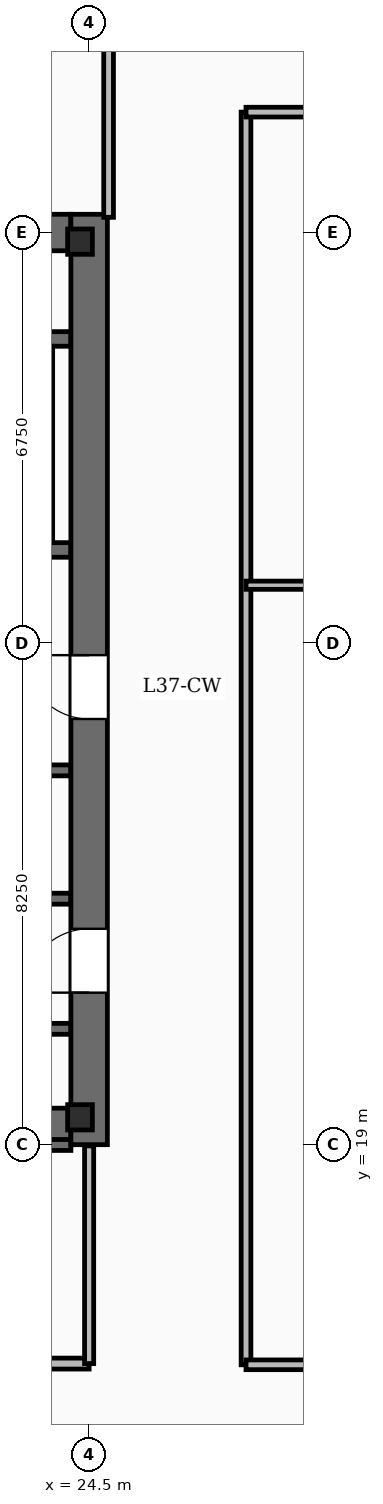
"""IFC4 building model, lengths in metres.
Left out: names, types, materials, properties, quantities, classifications, styles, units other than length and angle.
Written with IfcOpenShell. Run it as: python <this file> out.ifc"""

import sys

from ifc_helpers import new_model, si_unit, direction, frame, frame_2d, origin, origin_2d, place, context, subcontext, project, spatial, rectangle, i_section, extrude, element, fill, save


model = new_model("IFC4")
c1 = context("Model", 3, precision=1e-05, world=origin(), true_north=direction((0.0, 1.0)))
c2 = subcontext(c1, "Body", "Model", "MODEL_VIEW")
j1 = project(units=[si_unit("LENGTHUNIT", "METRE"), si_unit("PLANEANGLEUNIT", "RADIAN")], contexts=[c1])
p1 = place(None, origin())
s1 = spatial("IfcSite", under=j1, at=p1, CompositionType="ELEMENT")
p2 = place(p1, origin())
s2 = spatial("IfcBuilding", under=s1, at=p2, CompositionType="ELEMENT")
p3 = place(p2, frame((0.0, 0.0, 158.45)))
s3 = spatial("IfcBuildingStorey", under=s2, at=p3, CompositionType="ELEMENT", Elevation=158.45)
p4 = place(p3, frame((24.5, 19.0, -0.45), z_axis=(0.0, 0.0, 1.0), x_axis=(0.0, 1.0, 0.0)))
e1 = element("IfcWall", 1, at=p4, inside=s3, PredefinedType="SHEAR", context=c2, shape_type="SweptSolid", body=[
    extrude(rectangle(XDim=15.3, YDim=0.6, at=frame_2d((7.65, 0.0))), origin(), (0.0, 0.0, 1.0), 3.93),
])
p5 = place(p4, frame((2.5, 0.0, 0.45)))
e2 = element("IfcOpeningElement", 2, at=p5, cuts=e1, PredefinedType="OPENING", context=c2, shape_type="SweptSolid", body=[
    extrude(rectangle(XDim=1.05, YDim=2.15, at=frame_2d((0.525, 1.075))), frame((0.0, 0.31, 0.0), z_axis=(0.0, -1.0, 0.0), x_axis=(1.0, 0.0, 0.0)), (0.0, 0.0, 1.0), 0.62),
])
p6 = place(p4, frame((7.0, 0.0, 0.45)))
e3 = element("IfcOpeningElement", 3, at=p6, cuts=e1, PredefinedType="OPENING", context=c2, shape_type="SweptSolid", body=[
    extrude(rectangle(XDim=1.05, YDim=2.15, at=frame_2d((0.525, 1.075))), frame((0.0, 0.31, 0.0), z_axis=(0.0, -1.0, 0.0), x_axis=(1.0, 0.0, 0.0)), (0.0, 0.0, 1.0), 0.62),
])
for number, where, z_axis, x_axis in (
    (4, (14.7, 19.3, -0.45), (0.0, 0.0, 1.0), (1.0, 0.0, 0.0)),
    (5, (14.7, 34.0, -0.45), (0.0, 0.0, 1.0), (1.0, 0.0, 0.0)),
):
    element("IfcWall", number, at=place(p3, frame(where, z_axis=z_axis, x_axis=x_axis)), inside=s3, PredefinedType="SHEAR", context=c2, shape_type="SweptSolid", body=[
        extrude(rectangle(XDim=9.5, YDim=0.6, at=frame_2d((4.75, 0.0))), origin(), (0.0, 0.0, 1.0), 3.93),
    ])
for number, where, z_axis, x_axis in (
    (6, (24.35, 19.45, -0.45), (0.0, 0.0, 1.0), (1.0, 0.0, 0.0)),
    (7, (24.35, 33.85, -0.45), (0.0, 0.0, 1.0), (1.0, 0.0, 0.0)),
):
    element("IfcColumn", number, at=place(p3, frame(where, z_axis=z_axis, x_axis=x_axis)), inside=s3, PredefinedType="COLUMN", context=c2, shape_type="SweptSolid", body=[
        extrude(i_section(OverallWidth=0.406, OverallDepth=0.416, WebThickness=0.03, FlangeThickness=0.048, FilletRadius=0.02, at=origin_2d()), origin(), (0.0, 0.0, 1.0), 3.93),
    ])
p7 = place(p3, frame((24.2, 28.78, 0.0), z_axis=(0.0, 0.0, 1.0), x_axis=(-1.0, 0.0, 0.0)))
e8 = element("IfcWall", 8, at=p7, inside=s3, PredefinedType="SOLIDWALL", context=c2, shape_type="SweptSolid", body=[
    extrude(rectangle(XDim=9.5, YDim=0.24, at=frame_2d((4.75, 0.0))), origin(), (0.0, 0.0, 1.0), 3.48),
])
p8 = place(p7, frame((7.68, 0.0, 0.0)))
e9 = element("IfcOpeningElement", 9, at=p8, cuts=e8, PredefinedType="OPENING", context=c2, shape_type="SweptSolid", body=[
    extrude(rectangle(XDim=1.1, YDim=2.15, at=frame_2d((0.55, 1.075))), frame((0.0, 0.13, 0.0), z_axis=(0.0, -1.0, 0.0), x_axis=(1.0, 0.0, 0.0)), (0.0, 0.0, 1.0), 0.26),
])
p9 = place(p3, frame((14.7, 32.25, 0.0), z_axis=(0.0, 0.0, 1.0), x_axis=(1.0, 0.0, 0.0)))
e10 = element("IfcWall", 10, at=p9, inside=s3, PredefinedType="SOLIDWALL", context=c2, shape_type="SweptSolid", body=[
    extrude(rectangle(XDim=9.5, YDim=0.24, at=frame_2d((4.75, 0.0))), origin(), (0.0, 0.0, 1.0), 3.48),
])
p10 = place(p3, frame((23.78, 28.9, 0.0), z_axis=(0.0, 0.0, 1.0), x_axis=(0.0, 1.0, 0.0)))
e11 = element("IfcWall", 11, at=p10, inside=s3, PredefinedType="SOLIDWALL", context=c2, shape_type="SweptSolid", body=[
    extrude(rectangle(XDim=3.23, YDim=0.24, at=frame_2d((1.615, 0.0))), origin(), (0.0, 0.0, 1.0), 3.48),
])
p11 = place(p3, frame((20.9, 20.905, 0.0), z_axis=(0.0, 0.0, 1.0), x_axis=(1.0, 0.0, 0.0)))
e12 = element("IfcWall", 12, at=p11, inside=s3, PredefinedType="SOLIDWALL", context=c2, shape_type="SweptSolid", body=[
    extrude(rectangle(XDim=3.3, YDim=0.18, at=frame_2d((1.65, 0.0))), origin(), (0.0, 0.0, 1.0), 3.48),
])
p12 = place(p11, frame((0.7, 0.0, 0.0)))
e13 = element("IfcOpeningElement", 13, at=p12, cuts=e12, PredefinedType="OPENING", context=c2, shape_type="SweptSolid", body=[
    extrude(rectangle(XDim=1.2, YDim=2.2, at=frame_2d((0.6, 1.1))), frame((0.0, 0.1, 0.0), z_axis=(0.0, -1.0, 0.0), x_axis=(1.0, 0.0, 0.0)), (0.0, 0.0, 1.0), 0.2),
])
p13 = place(p3, frame((20.9, 18.995, 0.0), z_axis=(0.0, 0.0, 1.0), x_axis=(1.0, 0.0, 0.0)))
e14 = element("IfcWall", 14, at=p13, inside=s3, PredefinedType="SOLIDWALL", context=c2, shape_type="SweptSolid", body=[
    extrude(rectangle(XDim=3.3, YDim=0.18, at=frame_2d((1.65, 0.0))), origin(), (0.0, 0.0, 1.0), 3.48),
])
for number, where, z_axis, x_axis in (
    (15, (20.95, 25.155, 0.0), (0.0, 0.0, 1.0), (1.0, 0.0, 0.0)),
    (16, (20.95, 23.045, 0.0), (0.0, 0.0, 1.0), (1.0, 0.0, 0.0)),
):
    element("IfcWall", number, at=place(p3, frame(where, z_axis=z_axis, x_axis=x_axis)), inside=s3, PredefinedType="SOLIDWALL", context=c2, shape_type="SweptSolid", body=[
        extrude(rectangle(XDim=3.25, YDim=0.18, at=frame_2d((1.625, 0.0))), origin(), (0.0, 0.0, 1.0), 3.48),
    ])
p14 = place(p3, frame((14.6, 15.4, 0.0), z_axis=(0.0, 0.0, 1.0), x_axis=(1.0, 0.0, 0.0)))
e17 = element("IfcWall", 17, at=p14, inside=s3, PredefinedType="PARTITIONING", context=c2, shape_type="SweptSolid", body=[
    extrude(rectangle(XDim=9.9, YDim=0.18, at=frame_2d((4.95, 0.0))), origin(), (0.0, 0.0, 1.0), 2.54),
])
p15 = place(p14, frame((0.74, 0.0, 0.0)))
e18 = element("IfcOpeningElement", 18, at=p15, cuts=e17, PredefinedType="OPENING", context=c2, shape_type="SweptSolid", body=[
    extrude(rectangle(XDim=0.92, YDim=2.1, at=frame_2d((0.46, 1.05))), frame((0.0, 0.1, 0.0), z_axis=(0.0, -1.0, 0.0), x_axis=(1.0, 0.0, 0.0)), (0.0, 0.0, 1.0), 0.2),
])
p16 = place(p14, frame((3.19, 0.0, 0.0)))
e19 = element("IfcOpeningElement", 19, at=p16, cuts=e17, PredefinedType="OPENING", context=c2, shape_type="SweptSolid", body=[
    extrude(rectangle(XDim=0.92, YDim=2.1, at=frame_2d((0.46, 1.05))), frame((0.0, 0.1, 0.0), z_axis=(0.0, -1.0, 0.0), x_axis=(1.0, 0.0, 0.0)), (0.0, 0.0, 1.0), 0.2),
])
p17 = place(p14, frame((5.69, 0.0, 0.0)))
e20 = element("IfcOpeningElement", 20, at=p17, cuts=e17, PredefinedType="OPENING", context=c2, shape_type="SweptSolid", body=[
    extrude(rectangle(XDim=0.92, YDim=2.1, at=frame_2d((0.46, 1.05))), frame((0.0, 0.1, 0.0), z_axis=(0.0, -1.0, 0.0), x_axis=(1.0, 0.0, 0.0)), (0.0, 0.0, 1.0), 0.2),
])
p18 = place(p14, frame((8.19, 0.0, 0.0)))
e21 = element("IfcOpeningElement", 21, at=p18, cuts=e17, PredefinedType="OPENING", context=c2, shape_type="SweptSolid", body=[
    extrude(rectangle(XDim=0.92, YDim=2.1, at=frame_2d((0.46, 1.05))), frame((0.0, 0.1, 0.0), z_axis=(0.0, -1.0, 0.0), x_axis=(1.0, 0.0, 0.0)), (0.0, 0.0, 1.0), 0.2),
])
p19 = place(p3, frame((24.5, 15.4, 0.0), z_axis=(0.0, 0.0, 1.0), x_axis=(0.0, 1.0, 0.0)))
e22 = element("IfcWall", 22, at=p19, inside=s3, PredefinedType="PARTITIONING", context=c2, shape_type="SweptSolid", body=[
    extrude(rectangle(XDim=3.58, YDim=0.15, at=frame_2d((1.79, 0.0))), origin(), (0.0, 0.0, 1.0), 2.54),
])
p20 = place(p3, frame((24.82, 34.25, 0.0), z_axis=(0.0, 0.0, 1.0), x_axis=(0.0, 1.0, 0.0)))
e23 = element("IfcWall", 23, at=p20, inside=s3, PredefinedType="PARTITIONING", context=c2, shape_type="SweptSolid", body=[
    extrude(rectangle(XDim=3.97, YDim=0.16, at=frame_2d((1.985, 0.0))), origin(), (0.0, 0.0, 1.0), 2.54),
])
p21 = place(p3, frame((27.08, 28.2, 0.0), z_axis=(0.0, 0.0, 1.0), x_axis=(1.0, 0.0, 0.0)))
e24 = element("IfcWall", 24, at=p21, inside=s3, PredefinedType="PARTITIONING", context=c2, shape_type="SweptSolid", body=[
    extrude(rectangle(XDim=20.74, YDim=0.135, at=frame_2d((10.37, 0.0))), origin(), (0.0, 0.0, 1.0), 2.54),
])
p22 = place(p3, frame((27.08, 35.98, 0.0), z_axis=(0.0, 0.0, 1.0), x_axis=(1.0, 0.0, 0.0)))
e25 = element("IfcWall", 25, at=p22, inside=s3, PredefinedType="PARTITIONING", context=c2, shape_type="SweptSolid", body=[
    extrude(rectangle(XDim=20.74, YDim=0.16, at=frame_2d((10.37, 0.0))), origin(), (0.0, 0.0, 1.0), 2.54),
])
p23 = place(p22, frame((1.245, 0.0, 0.0)))
e26 = element("IfcOpeningElement", 26, at=p23, cuts=e25, PredefinedType="OPENING", context=c2, shape_type="SweptSolid", body=[
    extrude(rectangle(XDim=0.95, YDim=2.15, at=frame_2d((0.475, 1.075))), frame((0.0, 0.09, 0.0), z_axis=(0.0, -1.0, 0.0), x_axis=(1.0, 0.0, 0.0)), (0.0, 0.0, 1.0), 0.18),
])
p24 = place(p22, frame((6.445, 0.0, 0.0)))
e27 = element("IfcOpeningElement", 27, at=p24, cuts=e25, PredefinedType="OPENING", context=c2, shape_type="SweptSolid", body=[
    extrude(rectangle(XDim=0.95, YDim=2.15, at=frame_2d((0.475, 1.075))), frame((0.0, 0.09, 0.0), z_axis=(0.0, -1.0, 0.0), x_axis=(1.0, 0.0, 0.0)), (0.0, 0.0, 1.0), 0.18),
])
p25 = place(p22, frame((13.195, 0.0, 0.0)))
e28 = element("IfcOpeningElement", 28, at=p25, cuts=e25, PredefinedType="OPENING", context=c2, shape_type="SweptSolid", body=[
    extrude(rectangle(XDim=0.95, YDim=2.15, at=frame_2d((0.475, 1.075))), frame((0.0, 0.09, 0.0), z_axis=(0.0, -1.0, 0.0), x_axis=(1.0, 0.0, 0.0)), (0.0, 0.0, 1.0), 0.18),
])
p26 = place(p22, frame((18.345, 0.0, 0.0)))
e29 = element("IfcOpeningElement", 29, at=p26, cuts=e25, PredefinedType="OPENING", context=c2, shape_type="SweptSolid", body=[
    extrude(rectangle(XDim=0.95, YDim=2.15, at=frame_2d((0.475, 1.075))), frame((0.0, 0.09, 0.0), z_axis=(0.0, -1.0, 0.0), x_axis=(1.0, 0.0, 0.0)), (0.0, 0.0, 1.0), 0.18),
])
p27 = place(p3, frame((27.08, 15.38, 0.0), z_axis=(0.0, 0.0, 1.0), x_axis=(1.0, 0.0, 0.0)))
e30 = element("IfcWall", 30, at=p27, inside=s3, PredefinedType="PARTITIONING", context=c2, shape_type="SweptSolid", body=[
    extrude(rectangle(XDim=20.74, YDim=0.16, at=frame_2d((10.37, 0.0))), origin(), (0.0, 0.0, 1.0), 2.54),
])
p28 = place(p27, frame((1.245, 0.0, 0.0)))
e31 = element("IfcOpeningElement", 31, at=p28, cuts=e30, PredefinedType="OPENING", context=c2, shape_type="SweptSolid", body=[
    extrude(rectangle(XDim=0.95, YDim=2.15, at=frame_2d((0.475, 1.075))), frame((0.0, 0.09, 0.0), z_axis=(0.0, -1.0, 0.0), x_axis=(1.0, 0.0, 0.0)), (0.0, 0.0, 1.0), 0.18),
])
p29 = place(p27, frame((6.445, 0.0, 0.0)))
e32 = element("IfcOpeningElement", 32, at=p29, cuts=e30, PredefinedType="OPENING", context=c2, shape_type="SweptSolid", body=[
    extrude(rectangle(XDim=0.95, YDim=2.15, at=frame_2d((0.475, 1.075))), frame((0.0, 0.09, 0.0), z_axis=(0.0, -1.0, 0.0), x_axis=(1.0, 0.0, 0.0)), (0.0, 0.0, 1.0), 0.18),
])
p30 = place(p27, frame((13.195, 0.0, 0.0)))
e33 = element("IfcOpeningElement", 33, at=p30, cuts=e30, PredefinedType="OPENING", context=c2, shape_type="SweptSolid", body=[
    extrude(rectangle(XDim=0.95, YDim=2.15, at=frame_2d((0.475, 1.075))), frame((0.0, 0.09, 0.0), z_axis=(0.0, -1.0, 0.0), x_axis=(1.0, 0.0, 0.0)), (0.0, 0.0, 1.0), 0.18),
])
p31 = place(p27, frame((18.345, 0.0, 0.0)))
e34 = element("IfcOpeningElement", 34, at=p31, cuts=e30, PredefinedType="OPENING", context=c2, shape_type="SweptSolid", body=[
    extrude(rectangle(XDim=0.95, YDim=2.15, at=frame_2d((0.475, 1.075))), frame((0.0, 0.09, 0.0), z_axis=(0.0, -1.0, 0.0), x_axis=(1.0, 0.0, 0.0)), (0.0, 0.0, 1.0), 0.18),
])
p32 = place(p3, frame((27.08, 15.38, 0.0), z_axis=(0.0, 0.0, 1.0), x_axis=(0.0, 1.0, 0.0)))
e35 = element("IfcWall", 35, at=p32, inside=s3, PredefinedType="PARTITIONING", context=c2, shape_type="SweptSolid", body=[
    extrude(rectangle(XDim=20.6, YDim=0.16, at=frame_2d((10.3, 0.0))), origin(), (0.0, 0.0, 1.0), 2.54),
])
p33 = place(p5, origin())
e36 = element("IfcDoor", 36, at=p33, inside=s3, OperationType="SINGLE_SWING_LEFT", PredefinedType="DOOR", context=c2, shape_type="SweptSolid", body=[
    extrude(rectangle(XDim=1.05, YDim=2.15, at=frame_2d((0.525, 1.075))), frame((0.0, 0.025, 0.0), z_axis=(0.0, -1.0, 0.0), x_axis=(1.0, 0.0, 0.0)), (0.0, 0.0, 1.0), 0.05),
])
fill(e2, e36)
p34 = place(p6, origin())
e37 = element("IfcDoor", 37, at=p34, inside=s3, OperationType="SINGLE_SWING_RIGHT", PredefinedType="DOOR", context=c2, shape_type="SweptSolid", body=[
    extrude(rectangle(XDim=1.05, YDim=2.15, at=frame_2d((0.525, 1.075))), frame((0.0, 0.025, 0.0), z_axis=(0.0, -1.0, 0.0), x_axis=(1.0, 0.0, 0.0)), (0.0, 0.0, 1.0), 0.05),
])
fill(e3, e37)
save(model, sys.argv[1])
